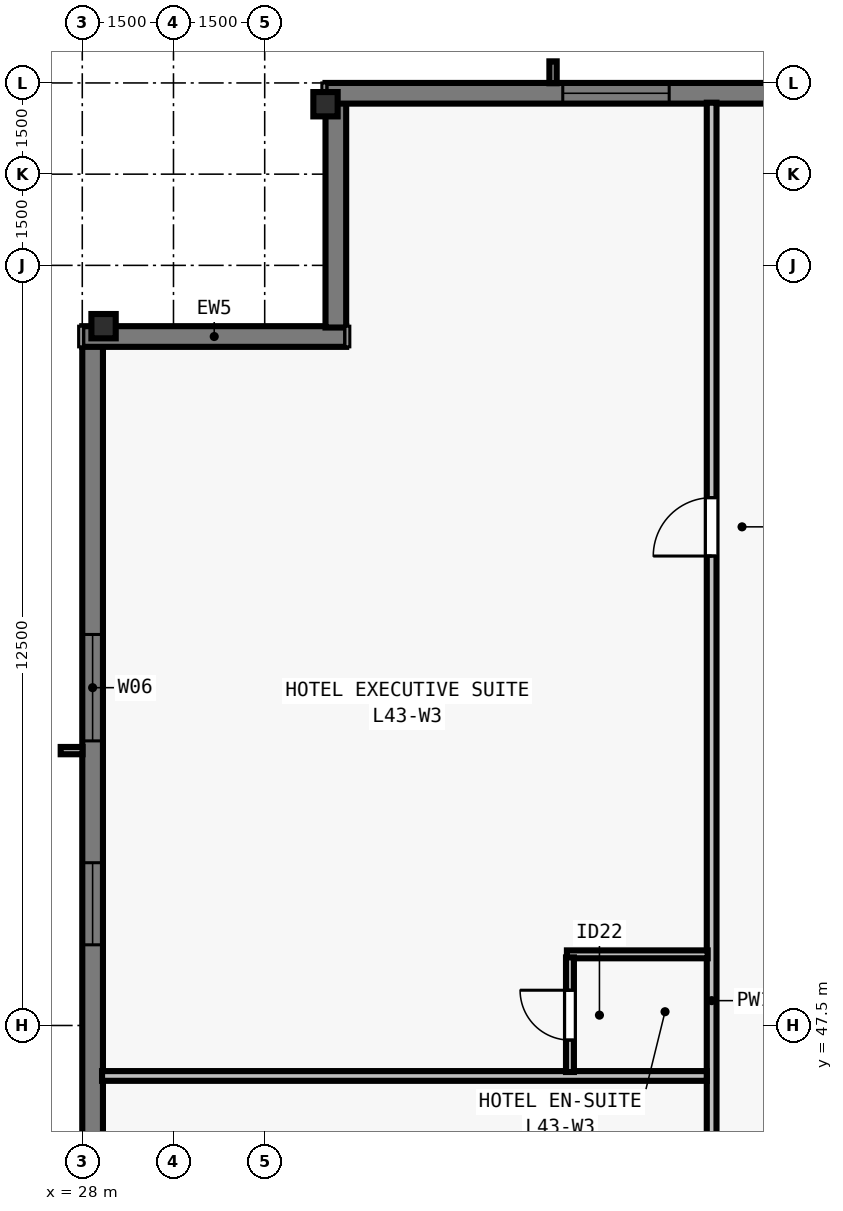
"""IFC4 building model, lengths in metres.
Left out: names, types, materials, properties, quantities, classifications, styles, units other than length and angle.
Written with IfcOpenShell. Run it as: python <this file> out.ifc"""

import sys

from ifc_helpers import new_model, si_unit, direction, frame, frame_2d, origin, origin_2d, place, context, subcontext, project, spatial, rectangle, i_section, extrude, element, fill, save


model = new_model("IFC4")
c1 = context("Model", 3, precision=1e-05, world=origin(), true_north=direction((0.0, 1.0)))
c2 = subcontext(c1, "Body", "Model", "MODEL_VIEW")
j1 = project(units=[si_unit("LENGTHUNIT", "METRE"), si_unit("PLANEANGLEUNIT", "RADIAN")], contexts=[c1])
p1 = place(None, origin())
s1 = spatial("IfcSite", under=j1, at=p1, CompositionType="ELEMENT")
p2 = place(p1, origin())
s2 = spatial("IfcBuilding", under=s1, at=p2, CompositionType="ELEMENT")
p3 = place(p2, frame((0.0, 0.0, 158.5)))
s3 = spatial("IfcBuildingStorey", under=s2, at=p3, CompositionType="ELEMENT", Elevation=158.5)
for number, where, z_axis, x_axis in (
    (1, (32.0, 62.65, 0.0), (0.0, 0.0, 1.0), (1.0, 0.0, 0.0)),
    (2, (28.35, 59.0, 0.0), (0.0, 0.0, 1.0), (0.0, 1.0, 0.0)),
):
    element("IfcColumn", number, at=place(p3, frame(where, z_axis=z_axis, x_axis=x_axis)), inside=s3, PredefinedType="COLUMN", context=c2, shape_type="SweptSolid", body=[
        extrude(i_section(OverallWidth=0.4, OverallDepth=0.4, WebThickness=0.022, FlangeThickness=0.036, at=origin_2d()), origin(), (0.0, 0.0, 1.0), 3.5),
    ])
p4 = place(p3, frame((28.17, 19.0, 0.0), z_axis=(0.0, 0.0, 1.0), x_axis=(0.0, 1.0, 0.0)))
e3 = element("IfcWall", 3, at=p4, inside=s3, PredefinedType="SOLIDWALL", context=c2, shape_type="SweptSolid", body=[
    extrude(rectangle(XDim=39.682, YDim=0.34, at=frame_2d((19.841, 0.0))), origin(), (0.0, 0.0, 1.0), 3.28),
])
p5 = place(p4, frame((4.752, 0.0, 0.8)))
e4 = element("IfcOpeningElement", 4, at=p5, cuts=e3, PredefinedType="OPENING", context=c2, shape_type="SweptSolid", body=[
    extrude(rectangle(XDim=1.75, YDim=1.66, at=frame_2d((0.875, 0.83))), frame((0.0, 0.18, 0.0), z_axis=(0.0, -1.0, 0.0), x_axis=(1.0, 0.0, 0.0)), (0.0, 0.0, 1.0), 0.36),
])
p6 = place(p4, frame((8.505, 0.0, 0.8)))
e5 = element("IfcOpeningElement", 5, at=p6, cuts=e3, PredefinedType="OPENING", context=c2, shape_type="SweptSolid", body=[
    extrude(rectangle(XDim=1.35, YDim=1.66, at=frame_2d((0.675, 0.83))), frame((0.0, 0.18, 0.0), z_axis=(0.0, -1.0, 0.0), x_axis=(1.0, 0.0, 0.0)), (0.0, 0.0, 1.0), 0.36),
])
p7 = place(p4, frame((16.062, 0.0, 0.8)))
e6 = element("IfcOpeningElement", 6, at=p7, cuts=e3, PredefinedType="OPENING", context=c2, shape_type="SweptSolid", body=[
    extrude(rectangle(XDim=1.35, YDim=1.66, at=frame_2d((0.675, 0.83))), frame((0.0, 0.18, 0.0), z_axis=(0.0, -1.0, 0.0), x_axis=(1.0, 0.0, 0.0)), (0.0, 0.0, 1.0), 0.36),
])
p8 = place(p4, frame((18.966, 0.0, 0.8)))
e7 = element("IfcOpeningElement", 7, at=p8, cuts=e3, PredefinedType="OPENING", context=c2, shape_type="SweptSolid", body=[
    extrude(rectangle(XDim=1.75, YDim=1.66, at=frame_2d((0.875, 0.83))), frame((0.0, 0.18, 0.0), z_axis=(0.0, -1.0, 0.0), x_axis=(1.0, 0.0, 0.0)), (0.0, 0.0, 1.0), 0.36),
])
p9 = place(p4, frame((22.719, 0.0, 0.8)))
e8 = element("IfcOpeningElement", 8, at=p9, cuts=e3, PredefinedType="OPENING", context=c2, shape_type="SweptSolid", body=[
    extrude(rectangle(XDim=1.35, YDim=1.66, at=frame_2d((0.675, 0.83))), frame((0.0, 0.18, 0.0), z_axis=(0.0, -1.0, 0.0), x_axis=(1.0, 0.0, 0.0)), (0.0, 0.0, 1.0), 0.36),
])
p10 = place(p4, frame((29.827, 0.0, 0.8)))
e9 = element("IfcOpeningElement", 9, at=p10, cuts=e3, PredefinedType="OPENING", context=c2, shape_type="SweptSolid", body=[
    extrude(rectangle(XDim=1.35, YDim=1.66, at=frame_2d((0.675, 0.83))), frame((0.0, 0.18, 0.0), z_axis=(0.0, -1.0, 0.0), x_axis=(1.0, 0.0, 0.0)), (0.0, 0.0, 1.0), 0.36),
])
p11 = place(p4, frame((33.18, 0.0, 0.8)))
e10 = element("IfcOpeningElement", 10, at=p11, cuts=e3, PredefinedType="OPENING", context=c2, shape_type="SweptSolid", body=[
    extrude(rectangle(XDim=1.75, YDim=1.66, at=frame_2d((0.875, 0.83))), frame((0.0, 0.18, 0.0), z_axis=(0.0, -1.0, 0.0), x_axis=(1.0, 0.0, 0.0)), (0.0, 0.0, 1.0), 0.36),
])
p12 = place(p3, frame((28.0, 58.83, 0.0), z_axis=(0.0, 0.0, 1.0), x_axis=(1.0, 0.0, 0.0)))
e11 = element("IfcWall", 11, at=p12, inside=s3, PredefinedType="SOLIDWALL", context=c2, shape_type="SweptSolid", body=[
    extrude(rectangle(XDim=4.34, YDim=0.34, at=frame_2d((2.17, 0.0))), origin(), (0.0, 0.0, 1.0), 3.28),
])
p13 = place(p3, frame((32.17, 58.978, 0.0), z_axis=(0.0, 0.0, 1.0), x_axis=(0.0, 1.0, 0.0)))
e12 = element("IfcWall", 12, at=p13, inside=s3, PredefinedType="SOLIDWALL", context=c2, shape_type="SweptSolid", body=[
    extrude(rectangle(XDim=3.704, YDim=0.34, at=frame_2d((1.852, 0.0))), origin(), (0.0, 0.0, 1.0), 3.28),
])
p14 = place(p3, frame((32.0, 62.83, 0.0), z_axis=(0.0, 0.0, 1.0), x_axis=(1.0, 0.0, 0.0)))
e13 = element("IfcWall", 13, at=p14, inside=s3, PredefinedType="SOLIDWALL", context=c2, shape_type="SweptSolid", body=[
    extrude(rectangle(XDim=39.682, YDim=0.34, at=frame_2d((19.841, 0.0))), origin(), (0.0, 0.0, 1.0), 3.28),
])
p15 = place(p14, frame((3.902, 0.0, 0.8)))
e14 = element("IfcOpeningElement", 14, at=p15, cuts=e13, PredefinedType="OPENING", context=c2, shape_type="SweptSolid", body=[
    extrude(rectangle(XDim=1.75, YDim=1.66, at=frame_2d((0.875, 0.83))), frame((0.0, 0.18, 0.0), z_axis=(0.0, -1.0, 0.0), x_axis=(1.0, 0.0, 0.0)), (0.0, 0.0, 1.0), 0.36),
])
p16 = place(p14, frame((8.955, 0.0, 0.8)))
e15 = element("IfcOpeningElement", 15, at=p16, cuts=e13, PredefinedType="OPENING", context=c2, shape_type="SweptSolid", body=[
    extrude(rectangle(XDim=1.35, YDim=1.66, at=frame_2d((0.675, 0.83))), frame((0.0, 0.18, 0.0), z_axis=(0.0, -1.0, 0.0), x_axis=(1.0, 0.0, 0.0)), (0.0, 0.0, 1.0), 0.36),
])
p17 = place(p14, frame((11.859, 0.0, 0.8)))
e16 = element("IfcOpeningElement", 16, at=p17, cuts=e13, PredefinedType="OPENING", context=c2, shape_type="SweptSolid", body=[
    extrude(rectangle(XDim=1.75, YDim=1.66, at=frame_2d((0.875, 0.83))), frame((0.0, 0.18, 0.0), z_axis=(0.0, -1.0, 0.0), x_axis=(1.0, 0.0, 0.0)), (0.0, 0.0, 1.0), 0.36),
])
p18 = place(p14, frame((16.062, 0.0, 0.8)))
e17 = element("IfcOpeningElement", 17, at=p18, cuts=e13, PredefinedType="OPENING", context=c2, shape_type="SweptSolid", body=[
    extrude(rectangle(XDim=1.35, YDim=1.66, at=frame_2d((0.675, 0.83))), frame((0.0, 0.18, 0.0), z_axis=(0.0, -1.0, 0.0), x_axis=(1.0, 0.0, 0.0)), (0.0, 0.0, 1.0), 0.36),
])
p19 = place(p14, frame((18.966, 0.0, 0.8)))
e18 = element("IfcOpeningElement", 18, at=p19, cuts=e13, PredefinedType="OPENING", context=c2, shape_type="SweptSolid", body=[
    extrude(rectangle(XDim=1.75, YDim=1.66, at=frame_2d((0.875, 0.83))), frame((0.0, 0.18, 0.0), z_axis=(0.0, -1.0, 0.0), x_axis=(1.0, 0.0, 0.0)), (0.0, 0.0, 1.0), 0.36),
])
p20 = place(p14, frame((22.719, 0.0, 0.8)))
e19 = element("IfcOpeningElement", 19, at=p20, cuts=e13, PredefinedType="OPENING", context=c2, shape_type="SweptSolid", body=[
    extrude(rectangle(XDim=1.35, YDim=1.66, at=frame_2d((0.675, 0.83))), frame((0.0, 0.18, 0.0), z_axis=(0.0, -1.0, 0.0), x_axis=(1.0, 0.0, 0.0)), (0.0, 0.0, 1.0), 0.36),
])
p21 = place(p14, frame((26.073, 0.0, 0.8)))
e20 = element("IfcOpeningElement", 20, at=p21, cuts=e13, PredefinedType="OPENING", context=c2, shape_type="SweptSolid", body=[
    extrude(rectangle(XDim=1.75, YDim=1.66, at=frame_2d((0.875, 0.83))), frame((0.0, 0.18, 0.0), z_axis=(0.0, -1.0, 0.0), x_axis=(1.0, 0.0, 0.0)), (0.0, 0.0, 1.0), 0.36),
])
p22 = place(p14, frame((28.977, 0.0, 0.8)))
e21 = element("IfcOpeningElement", 21, at=p22, cuts=e13, PredefinedType="OPENING", context=c2, shape_type="SweptSolid", body=[
    extrude(rectangle(XDim=1.35, YDim=1.66, at=frame_2d((0.675, 0.83))), frame((0.0, 0.18, 0.0), z_axis=(0.0, -1.0, 0.0), x_axis=(1.0, 0.0, 0.0)), (0.0, 0.0, 1.0), 0.36),
])
p23 = place(p14, frame((33.18, 0.0, 0.8)))
e22 = element("IfcOpeningElement", 22, at=p23, cuts=e13, PredefinedType="OPENING", context=c2, shape_type="SweptSolid", body=[
    extrude(rectangle(XDim=1.75, YDim=1.66, at=frame_2d((0.875, 0.83))), frame((0.0, 0.18, 0.0), z_axis=(0.0, -1.0, 0.0), x_axis=(1.0, 0.0, 0.0)), (0.0, 0.0, 1.0), 0.36),
])
p24 = place(p3, frame((38.35, 15.325, 0.0), z_axis=(0.0, 0.0, 1.0), x_axis=(0.0, 1.0, 0.0)))
e23 = element("IfcWall", 23, at=p24, inside=s3, PredefinedType="PARTITIONING", context=c2, shape_type="SweptSolid", body=[
    extrude(rectangle(XDim=47.35, YDim=0.16, at=frame_2d((23.675, 0.0))), origin(), (0.0, 0.0, 1.0), 2.555),
])
p25 = place(p24, frame((8.912, 0.0, 0.0)))
e24 = element("IfcOpeningElement", 24, at=p25, cuts=e23, PredefinedType="OPENING", context=c2, shape_type="SweptSolid", body=[
    extrude(rectangle(XDim=0.96, YDim=2.15, at=frame_2d((0.48, 1.075))), frame((0.0, 0.09, 0.0), z_axis=(0.0, -1.0, 0.0), x_axis=(1.0, 0.0, 0.0)), (0.0, 0.0, 1.0), 0.18),
])
p26 = place(p24, frame((24.312, 0.0, 0.0)))
e25 = element("IfcOpeningElement", 25, at=p26, cuts=e23, PredefinedType="OPENING", context=c2, shape_type="SweptSolid", body=[
    extrude(rectangle(XDim=0.96, YDim=2.15, at=frame_2d((0.48, 1.075))), frame((0.0, 0.09, 0.0), z_axis=(0.0, -1.0, 0.0), x_axis=(1.0, 0.0, 0.0)), (0.0, 0.0, 1.0), 0.18),
])
p27 = place(p24, frame((39.895, 0.0, 0.0)))
e26 = element("IfcOpeningElement", 26, at=p27, cuts=e23, PredefinedType="OPENING", context=c2, shape_type="SweptSolid", body=[
    extrude(rectangle(XDim=0.96, YDim=2.15, at=frame_2d((0.48, 1.075))), frame((0.0, 0.09, 0.0), z_axis=(0.0, -1.0, 0.0), x_axis=(1.0, 0.0, 0.0)), (0.0, 0.0, 1.0), 0.18),
])
p28 = place(p3, frame((28.325, 46.67, 0.0), z_axis=(0.0, 0.0, 1.0), x_axis=(1.0, 0.0, 0.0)))
e27 = element("IfcWall", 27, at=p28, inside=s3, PredefinedType="PARTITIONING", context=c2, shape_type="SweptSolid", body=[
    extrude(rectangle(XDim=9.945, YDim=0.16, at=frame_2d((4.973, 0.0))), origin(), (0.0, 0.0, 1.0), 3.28),
])
p29 = place(p3, frame((35.97, 48.67, 0.0), z_axis=(0.0, 0.0, 1.0), x_axis=(1.0, 0.0, 0.0)))
e28 = element("IfcWall", 28, at=p29, inside=s3, PredefinedType="PLUMBINGWALL", context=c2, shape_type="SweptSolid", body=[
    extrude(rectangle(XDim=2.315, YDim=0.13, at=frame_2d((1.157, 0.0))), origin(), (0.0, 0.0, 1.0), 3.28),
])
p30 = place(p3, frame((36.02, 46.735, 0.0), z_axis=(0.0, 0.0, 1.0), x_axis=(0.0, 1.0, 0.0)))
e29 = element("IfcWall", 29, at=p30, inside=s3, PredefinedType="PLUMBINGWALL", context=c2, shape_type="SweptSolid", body=[
    extrude(rectangle(XDim=1.885, YDim=0.13, at=frame_2d((0.942, 0.0))), origin(), (0.0, 0.0, 1.0), 3.28),
])
p31 = place(p30, frame((0.525, 0.0, 0.0)))
e30 = element("IfcOpeningElement", 30, at=p31, cuts=e29, PredefinedType="OPENING", context=c2, shape_type="SweptSolid", body=[
    extrude(rectangle(XDim=0.82, YDim=2.1, at=frame_2d((0.41, 1.05))), frame((0.0, 0.075, 0.0), z_axis=(0.0, -1.0, 0.0), x_axis=(1.0, 0.0, 0.0)), (0.0, 0.0, 1.0), 0.15),
])
p32 = place(p10, origin())
e31 = element("IfcWindow", 31, at=p32, inside=s3, PartitioningType="SINGLE_PANEL", PredefinedType="WINDOW", context=c2, shape_type="SweptSolid", body=[
    extrude(rectangle(XDim=1.35, YDim=1.66, at=frame_2d((0.675, 0.83))), frame((0.0, -0.05, 0.0), z_axis=(0.0, -1.0, 0.0), x_axis=(1.0, 0.0, 0.0)), (0.0, 0.0, 1.0), 0.06),
])
fill(e9, e31)
p33 = place(p11, origin())
e32 = element("IfcWindow", 32, at=p33, inside=s3, PartitioningType="SINGLE_PANEL", PredefinedType="WINDOW", context=c2, shape_type="SweptSolid", body=[
    extrude(rectangle(XDim=1.75, YDim=1.66, at=frame_2d((0.875, 0.83))), frame((0.0, -0.05, 0.0), z_axis=(0.0, -1.0, 0.0), x_axis=(1.0, 0.0, 0.0)), (0.0, 0.0, 1.0), 0.06),
])
fill(e10, e32)
p34 = place(p15, origin())
e33 = element("IfcWindow", 33, at=p34, inside=s3, PartitioningType="SINGLE_PANEL", PredefinedType="WINDOW", context=c2, shape_type="SweptSolid", body=[
    extrude(rectangle(XDim=1.75, YDim=1.66, at=frame_2d((0.875, 0.83))), frame((0.0, -0.05, 0.0), z_axis=(0.0, -1.0, 0.0), x_axis=(1.0, 0.0, 0.0)), (0.0, 0.0, 1.0), 0.06),
])
fill(e14, e33)
p35 = place(p31, origin())
e34 = element("IfcDoor", 34, at=p35, inside=s3, OperationType="SINGLE_SWING_RIGHT", PredefinedType="DOOR", context=c2, shape_type="SweptSolid", body=[
    extrude(rectangle(XDim=0.82, YDim=2.1, at=frame_2d((0.41, 1.05))), frame((0.0, 0.025, 0.0), z_axis=(0.0, -1.0, 0.0), x_axis=(1.0, 0.0, 0.0)), (0.0, 0.0, 1.0), 0.05),
])
fill(e30, e34)
p36 = place(p27, origin())
e35 = element("IfcDoor", 35, at=p36, inside=s3, OperationType="SINGLE_SWING_LEFT", PredefinedType="DOOR", context=c2, shape_type="SweptSolid", body=[
    extrude(rectangle(XDim=0.96, YDim=2.15, at=frame_2d((0.48, 1.075))), frame((0.0, 0.025, 0.0), z_axis=(0.0, -1.0, 0.0), x_axis=(1.0, 0.0, 0.0)), (0.0, 0.0, 1.0), 0.05),
])
fill(e26, e35)
save(model, sys.argv[1])
